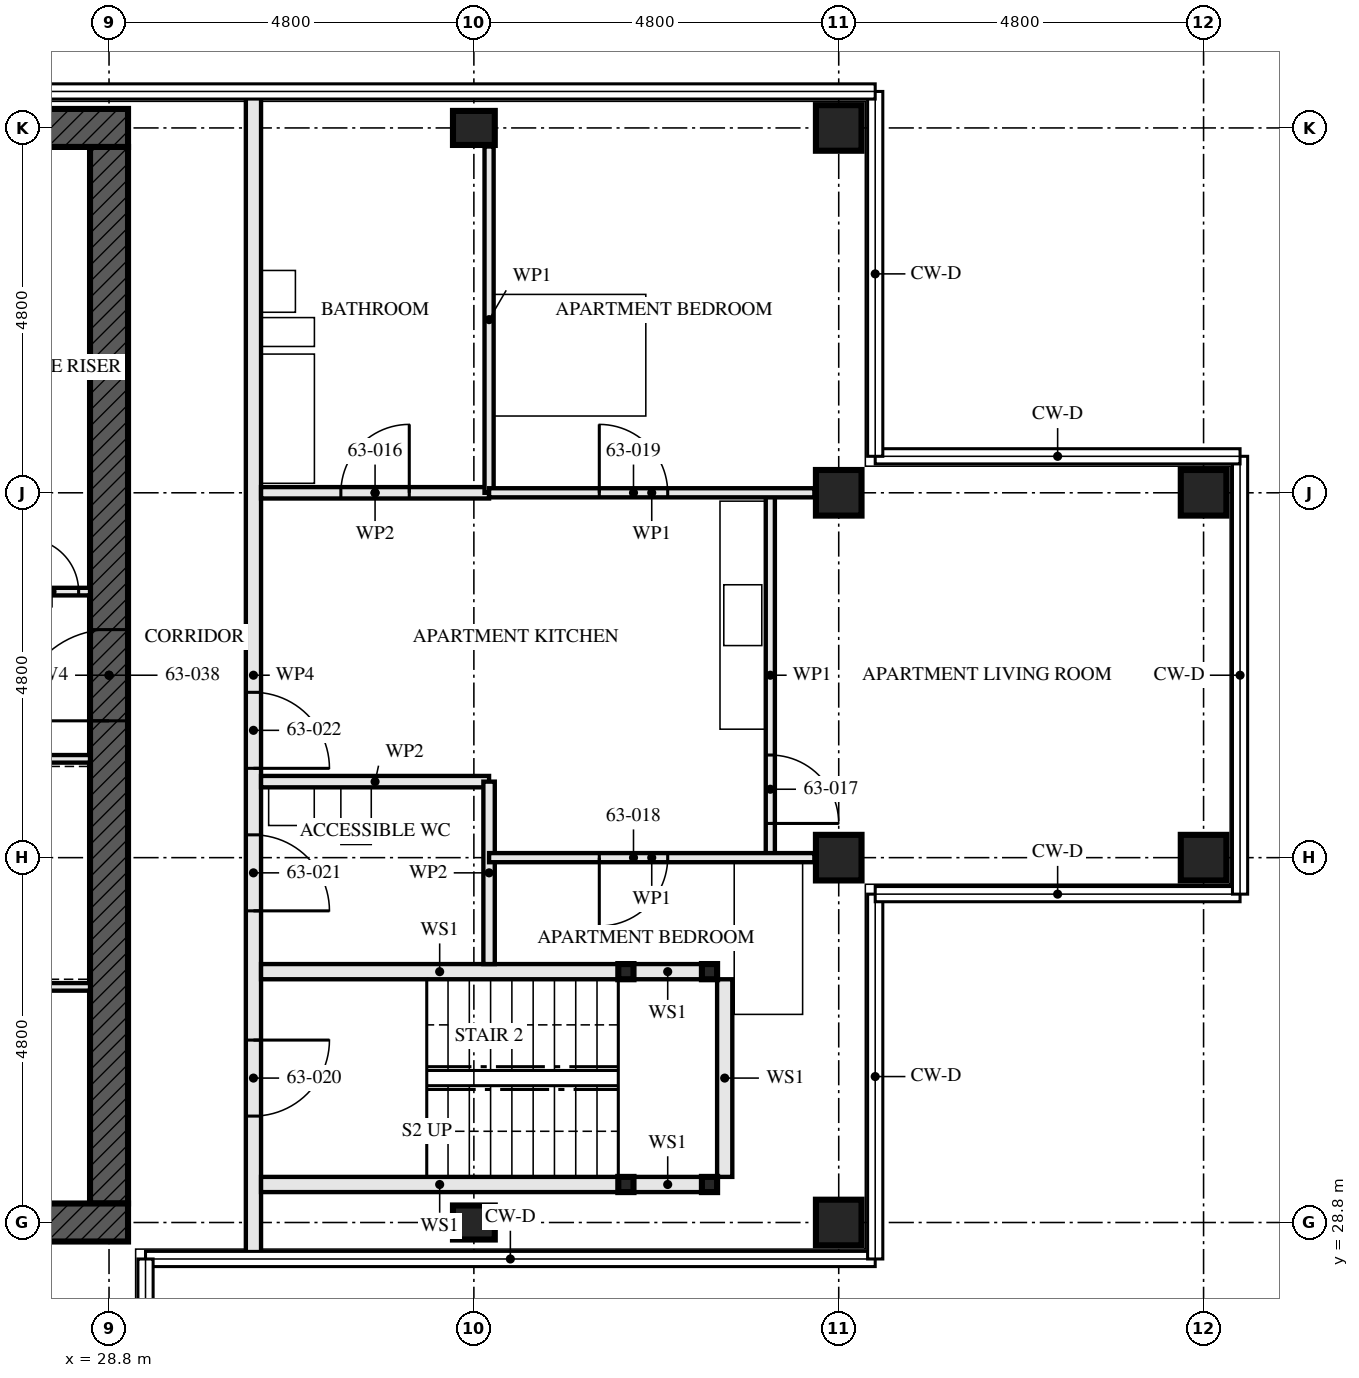
"""IFC4 building model, lengths in metres.
Left out: names, types, materials, properties, quantities, classifications, styles, units other than length and angle.
Written with IfcOpenShell. Run it as: python <this file> out.ifc"""

import sys

from ifc_helpers import new_model, si_unit, direction, frame, frame_2d, origin, origin_2d, place, context, subcontext, project, spatial, rectangle, hollow_rectangle, i_section, extrude, element, fill, save


model = new_model("IFC4")
c1 = context("Model", 3, precision=1e-05, world=origin(), true_north=direction((0.0, 1.0)))
c2 = subcontext(c1, "Body", "Model", "MODEL_VIEW")
j1 = project(units=[si_unit("LENGTHUNIT", "METRE"), si_unit("PLANEANGLEUNIT", "RADIAN")], contexts=[c1])
p1 = place(None, origin())
s1 = spatial("IfcSite", under=j1, at=p1, CompositionType="ELEMENT")
p2 = place(p1, origin())
s2 = spatial("IfcBuilding", under=s1, at=p2, CompositionType="ELEMENT")
p3 = place(p2, frame((0.0, 0.0, 229.5)))
s3 = spatial("IfcBuildingStorey", under=s2, at=p3, CompositionType="ELEMENT", Elevation=229.5)
for number, where, z_axis, x_axis in (
    (1, (33.6, 28.8, 0.0), (0.0, 0.0, 1.0), (0.0, 1.0, 0.0)),
    (2, (33.6, 43.2, 0.0), (0.0, 0.0, 1.0), (0.0, 1.0, 0.0)),
):
    element("IfcColumn", number, at=place(p3, frame(where, z_axis=z_axis, x_axis=x_axis)), inside=s3, PredefinedType="COLUMN", context=c2, shape_type="SweptSolid", body=[
        extrude(i_section(OverallWidth=0.448, OverallDepth=0.55, WebThickness=0.072, FlangeThickness=0.115, FilletRadius=0.015, at=origin_2d()), origin(), (0.0, 0.0, 1.0), 3.5),
    ])
for number, where, z_axis, x_axis in (
    (3, (38.4, 28.8, 0.0), (0.0, 0.0, 1.0), (0.0, 1.0, 0.0)),
    (4, (38.4, 33.6, 0.0), (0.0, 0.0, 1.0), (0.0, 1.0, 0.0)),
    (5, (38.4, 38.4, 0.0), (0.0, 0.0, 1.0), (0.0, 1.0, 0.0)),
    (6, (38.4, 43.2, 0.0), (0.0, 0.0, 1.0), (0.0, 1.0, 0.0)),
    (7, (43.2, 33.6, 0.0), (0.0, 0.0, 1.0), (0.0, 1.0, 0.0)),
    (8, (43.2, 38.4, 0.0), (0.0, 0.0, 1.0), (0.0, 1.0, 0.0)),
):
    element("IfcColumn", number, at=place(p3, frame(where, z_axis=z_axis, x_axis=x_axis)), inside=s3, PredefinedType="COLUMN", context=c2, shape_type="SweptSolid", body=[
        extrude(hollow_rectangle(XDim=0.6, YDim=0.6, WallThickness=0.05, at=origin_2d()), origin(), (0.0, 0.0, 1.0), 3.5),
    ])
p4 = place(p3, frame((14.15, 28.8, -0.17), z_axis=(0.0, 0.0, 1.0), x_axis=(1.0, 0.0, 0.0)))
e9 = element("IfcWall", 9, at=p4, inside=s3, PredefinedType="SHEAR", context=c2, shape_type="SweptSolid", body=[
    extrude(rectangle(XDim=14.9, YDim=0.5, at=frame_2d((7.45, 0.0))), origin(), (0.0, 0.0, 1.0), 3.5),
])
p5 = place(p4, frame((6.85, 0.0, 0.17)))
e10 = element("IfcOpeningElement", 10, at=p5, cuts=e9, PredefinedType="OPENING", context=c2, shape_type="SweptSolid", body=[
    extrude(rectangle(XDim=1.2, YDim=2.1, at=frame_2d((0.6, 1.05))), frame((0.0, 0.26, 0.0), z_axis=(0.0, -1.0, 0.0), x_axis=(1.0, 0.0, 0.0)), (0.0, 0.0, 1.0), 0.521),
])
p6 = place(p3, frame((29.05, 43.2, -0.17), z_axis=(0.0, 0.0, 1.0), x_axis=(-1.0, 0.0, 0.0)))
e11 = element("IfcWall", 11, at=p6, inside=s3, PredefinedType="SHEAR", context=c2, shape_type="SweptSolid", body=[
    extrude(rectangle(XDim=14.9, YDim=0.5, at=frame_2d((7.45, 0.0))), origin(), (0.0, 0.0, 1.0), 3.5),
])
p7 = place(p3, frame((28.8, 29.05, -0.17), z_axis=(0.0, 0.0, 1.0), x_axis=(0.0, 1.0, 0.0)))
e12 = element("IfcWall", 12, at=p7, inside=s3, PredefinedType="SHEAR", context=c2, shape_type="SweptSolid", body=[
    extrude(rectangle(XDim=13.9, YDim=0.5, at=frame_2d((6.95, 0.0))), origin(), (0.0, 0.0, 1.0), 3.5),
])
p8 = place(p7, frame((6.35, 0.0, 0.17)))
e13 = element("IfcOpeningElement", 13, at=p8, cuts=e12, PredefinedType="OPENING", context=c2, shape_type="SweptSolid", body=[
    extrude(rectangle(XDim=1.2, YDim=2.1, at=frame_2d((0.6, 1.05))), frame((0.0, 0.26, 0.0), z_axis=(0.0, -1.0, 0.0), x_axis=(1.0, 0.0, 0.0)), (0.0, 0.0, 1.0), 0.521),
])
for number, where, z_axis, x_axis in (
    (14, (36.7, 29.3, 0.0), (0.0, 0.0, 1.0), (1.0, 0.0, 0.0)),
    (15, (36.7, 32.1, 0.0), (0.0, 0.0, 1.0), (1.0, 0.0, 0.0)),
    (16, (35.6, 29.3, 0.0), (0.0, 0.0, 1.0), (1.0, 0.0, 0.0)),
    (17, (35.6, 32.1, 0.0), (0.0, 0.0, 1.0), (1.0, 0.0, 0.0)),
):
    element("IfcColumn", number, at=place(p3, frame(where, z_axis=z_axis, x_axis=x_axis)), inside=s3, PredefinedType="COLUMN", context=c2, shape_type="SweptSolid", body=[
        extrude(hollow_rectangle(XDim=0.2, YDim=0.2, WallThickness=0.008, at=origin_2d()), origin(), (0.0, 0.0, 1.0), 3.33),
    ])
p9 = place(p3, frame((36.6, 29.3, 0.0), z_axis=(0.0, 0.0, 1.0), x_axis=(-1.0, 0.0, 0.0)))
e18 = element("IfcWall", 18, at=p9, inside=s3, PredefinedType="SOLIDWALL", context=c2, shape_type="SweptSolid", body=[
    extrude(rectangle(XDim=0.9, YDim=0.2, at=frame_2d((0.45, 0.0))), origin(), (0.0, 0.0, 1.0), 2.99),
])
p10 = place(p3, frame((35.5, 29.3, 0.0), z_axis=(0.0, 0.0, 1.0), x_axis=(-1.0, 0.0, 0.0)))
e19 = element("IfcWall", 19, at=p10, inside=s3, PredefinedType="SOLIDWALL", context=c2, shape_type="SweptSolid", body=[
    extrude(rectangle(XDim=4.7, YDim=0.2, at=frame_2d((2.35, 0.0))), origin(), (0.0, 0.0, 1.0), 2.99),
])
p11 = place(p3, frame((36.6, 32.1, 0.0), z_axis=(0.0, 0.0, 1.0), x_axis=(-1.0, 0.0, 0.0)))
e20 = element("IfcWall", 20, at=p11, inside=s3, PredefinedType="SOLIDWALL", context=c2, shape_type="SweptSolid", body=[
    extrude(rectangle(XDim=0.9, YDim=0.2, at=frame_2d((0.45, 0.0))), origin(), (0.0, 0.0, 1.0), 2.99),
])
p12 = place(p3, frame((35.5, 32.1, 0.0), z_axis=(0.0, 0.0, 1.0), x_axis=(-1.0, 0.0, 0.0)))
e21 = element("IfcWall", 21, at=p12, inside=s3, PredefinedType="SOLIDWALL", context=c2, shape_type="SweptSolid", body=[
    extrude(rectangle(XDim=4.7, YDim=0.2, at=frame_2d((2.35, 0.0))), origin(), (0.0, 0.0, 1.0), 2.99),
])
p13 = place(p3, frame((36.9, 29.4, 0.0), z_axis=(0.0, 0.0, 1.0), x_axis=(0.0, 1.0, 0.0)))
e22 = element("IfcWall", 22, at=p13, inside=s3, PredefinedType="SOLIDWALL", context=c2, shape_type="SweptSolid", body=[
    extrude(rectangle(XDim=2.6, YDim=0.2, at=frame_2d((1.3, 0.0))), origin(), (0.0, 0.0, 1.0), 3.33),
])
p14 = place(p3, frame((33.8, 32.2, 0.0), z_axis=(0.0, 0.0, 1.0), x_axis=(0.0, 1.0, 0.0)))
e23 = element("IfcWall", 23, at=p14, inside=s3, PredefinedType="PARTITIONING", context=c2, shape_type="SweptSolid", body=[
    extrude(rectangle(XDim=2.4, YDim=0.15, at=frame_2d((1.2, 0.0))), origin(), (0.0, 0.0, 1.0), 2.55),
])
p15 = place(p3, frame((33.8, 34.6, 0.0), z_axis=(0.0, 0.0, 1.0), x_axis=(-1.0, 0.0, 0.0)))
e24 = element("IfcWall", 24, at=p15, inside=s3, PredefinedType="PARTITIONING", context=c2, shape_type="SweptSolid", body=[
    extrude(rectangle(XDim=3.0, YDim=0.15, at=frame_2d((1.5, 0.0))), origin(), (0.0, 0.0, 1.0), 3.33),
])
p16 = place(p3, frame((33.8, 38.4, 0.0), z_axis=(0.0, 0.0, 1.0), x_axis=(-1.0, 0.0, 0.0)))
e25 = element("IfcWall", 25, at=p16, inside=s3, PredefinedType="PARTITIONING", context=c2, shape_type="SweptSolid", body=[
    extrude(rectangle(XDim=3.0, YDim=0.15, at=frame_2d((1.5, 0.0))), origin(), (0.0, 0.0, 1.0), 2.55),
])
p17 = place(p16, frame((1.05, 0.0, 0.0)))
e26 = element("IfcOpeningElement", 26, at=p17, cuts=e25, PredefinedType="OPENING", context=c2, shape_type="SweptSolid", body=[
    extrude(rectangle(XDim=0.9, YDim=2.1, at=frame_2d((0.45, 1.05))), frame((0.0, 0.085, 0.0), z_axis=(0.0, -1.0, 0.0), x_axis=(1.0, 0.0, 0.0)), (0.0, 0.0, 1.0), 0.171),
])
p18 = place(p3, frame((37.5, 33.6, 0.0), z_axis=(0.0, 0.0, 1.0), x_axis=(0.0, 1.0, 0.0)))
e27 = element("IfcWall", 27, at=p18, inside=s3, PredefinedType="PARTITIONING", context=c2, shape_type="SweptSolid", body=[
    extrude(rectangle(XDim=4.8, YDim=0.12, at=frame_2d((2.4, 0.0))), origin(), (0.0, 0.0, 1.0), 3.33),
])
p19 = place(p18, frame((0.45, 0.0, 0.0)))
e28 = element("IfcOpeningElement", 28, at=p19, cuts=e27, PredefinedType="OPENING", context=c2, shape_type="SweptSolid", body=[
    extrude(rectangle(XDim=0.9, YDim=2.1, at=frame_2d((0.45, 1.05))), frame((0.0, 0.071, 0.0), z_axis=(0.0, -1.0, 0.0), x_axis=(1.0, 0.0, 0.0)), (0.0, 0.0, 1.0), 0.141),
])
p20 = place(p3, frame((33.8, 38.4, 0.0), z_axis=(0.0, 0.0, 1.0), x_axis=(0.0, 1.0, 0.0)))
e29 = element("IfcWall", 29, at=p20, inside=s3, PredefinedType="PARTITIONING", context=c2, shape_type="SweptSolid", body=[
    extrude(rectangle(XDim=4.556, YDim=0.12, at=frame_2d((2.278, 0.0))), origin(), (0.0, 0.0, 1.0), 3.33),
])
p21 = place(p3, frame((38.08, 33.6, 0.0), z_axis=(0.0, 0.0, 1.0), x_axis=(-1.0, 0.0, 0.0)))
e30 = element("IfcWall", 30, at=p21, inside=s3, PredefinedType="PARTITIONING", context=c2, shape_type="SweptSolid", body=[
    extrude(rectangle(XDim=4.28, YDim=0.12, at=frame_2d((2.14, 0.0))), origin(), (0.0, 0.0, 1.0), 2.55),
])
p22 = place(p21, frame((1.93, 0.0, 0.0)))
e31 = element("IfcOpeningElement", 31, at=p22, cuts=e30, PredefinedType="OPENING", context=c2, shape_type="SweptSolid", body=[
    extrude(rectangle(XDim=0.9, YDim=2.1, at=frame_2d((0.45, 1.05))), frame((0.0, 0.071, 0.0), z_axis=(0.0, -1.0, 0.0), x_axis=(1.0, 0.0, 0.0)), (0.0, 0.0, 1.0), 0.141),
])
p23 = place(p3, frame((38.08, 38.4, 0.0), z_axis=(0.0, 0.0, 1.0), x_axis=(-1.0, 0.0, 0.0)))
e32 = element("IfcWall", 32, at=p23, inside=s3, PredefinedType="PARTITIONING", context=c2, shape_type="SweptSolid", body=[
    extrude(rectangle(XDim=4.28, YDim=0.12, at=frame_2d((2.14, 0.0))), origin(), (0.0, 0.0, 1.0), 2.55),
])
p24 = place(p23, frame((1.93, 0.0, 0.0)))
e33 = element("IfcOpeningElement", 33, at=p24, cuts=e32, PredefinedType="OPENING", context=c2, shape_type="SweptSolid", body=[
    extrude(rectangle(XDim=0.9, YDim=2.1, at=frame_2d((0.45, 1.05))), frame((0.0, 0.071, 0.0), z_axis=(0.0, -1.0, 0.0), x_axis=(1.0, 0.0, 0.0)), (0.0, 0.0, 1.0), 0.141),
])
p25 = place(p3, frame((30.7, 28.345, 0.0), z_axis=(0.0, 0.0, 1.0), x_axis=(0.0, 1.0, 0.0)))
e34 = element("IfcWall", 34, at=p25, inside=s3, PredefinedType="PARTITIONING", context=c2, shape_type="SweptSolid", body=[
    extrude(rectangle(XDim=15.31, YDim=0.2, at=frame_2d((7.655, 0.0))), origin(), (0.0, 0.0, 1.0), 2.32),
])
p26 = place(p25, frame((1.855, 0.0, 0.0)))
e35 = element("IfcOpeningElement", 35, at=p26, cuts=e34, PredefinedType="OPENING", context=c2, shape_type="SweptSolid", body=[
    extrude(rectangle(XDim=1.0, YDim=2.1, at=frame_2d((0.5, 1.05))), frame((0.0, 0.111, 0.0), z_axis=(0.0, -1.0, 0.0), x_axis=(1.0, 0.0, 0.0)), (0.0, 0.0, 1.0), 0.221),
])
p27 = place(p25, frame((4.555, 0.0, 0.0)))
e36 = element("IfcOpeningElement", 36, at=p27, cuts=e34, PredefinedType="OPENING", context=c2, shape_type="SweptSolid", body=[
    extrude(rectangle(XDim=1.0, YDim=2.1, at=frame_2d((0.5, 1.05))), frame((0.0, 0.111, 0.0), z_axis=(0.0, -1.0, 0.0), x_axis=(1.0, 0.0, 0.0)), (0.0, 0.0, 1.0), 0.221),
])
p28 = place(p25, frame((6.43, 0.0, 0.0)))
e37 = element("IfcOpeningElement", 37, at=p28, cuts=e34, PredefinedType="OPENING", context=c2, shape_type="SweptSolid", body=[
    extrude(rectangle(XDim=1.0, YDim=2.1, at=frame_2d((0.5, 1.05))), frame((0.0, 0.111, 0.0), z_axis=(0.0, -1.0, 0.0), x_axis=(1.0, 0.0, 0.0)), (0.0, 0.0, 1.0), 0.221),
])
p29 = place(p3, frame((23.05, 34.9, 0.0), z_axis=(0.0, 0.0, 1.0), x_axis=(1.0, 0.0, 0.0)))
e38 = element("IfcWall", 38, at=p29, inside=s3, PredefinedType="SOLIDWALL", context=c2, shape_type="SweptSolid", body=[
    extrude(rectangle(XDim=5.5, YDim=0.1, at=frame_2d((2.75, 0.0))), origin(), (0.0, 0.0, 1.0), 3.33),
])
p30 = place(p29, frame((0.85, 0.0, 0.0)))
e39 = element("IfcOpeningElement", 39, at=p30, cuts=e38, PredefinedType="OPENING", context=c2, shape_type="SweptSolid", body=[
    extrude(rectangle(XDim=1.0, YDim=2.1, at=frame_2d((0.5, 1.05))), frame((0.0, 0.061, 0.0), z_axis=(0.0, -1.0, 0.0), x_axis=(1.0, 0.0, 0.0)), (0.0, 0.0, 1.0), 0.121),
])
p31 = place(p29, frame((3.625, 0.0, 0.0)))
e40 = element("IfcOpeningElement", 40, at=p31, cuts=e38, PredefinedType="OPENING", context=c2, shape_type="SweptSolid", body=[
    extrude(rectangle(XDim=1.0, YDim=2.1, at=frame_2d((0.5, 1.05))), frame((0.0, 0.061, 0.0), z_axis=(0.0, -1.0, 0.0), x_axis=(1.0, 0.0, 0.0)), (0.0, 0.0, 1.0), 0.121),
])
p32 = place(p3, frame((22.65, 37.1, 0.0), z_axis=(0.0, 0.0, 1.0), x_axis=(1.0, 0.0, 0.0)))
e41 = element("IfcWall", 41, at=p32, inside=s3, PredefinedType="SOLIDWALL", context=c2, shape_type="SweptSolid", body=[
    extrude(rectangle(XDim=5.9, YDim=0.1, at=frame_2d((2.95, 0.0))), origin(), (0.0, 0.0, 1.0), 3.33),
])
p33 = place(p32, frame((3.5, 0.0, 0.0)))
e42 = element("IfcOpeningElement", 42, at=p33, cuts=e41, PredefinedType="OPENING", context=c2, shape_type="SweptSolid", body=[
    extrude(rectangle(XDim=0.9, YDim=2.1, at=frame_2d((0.45, 1.05))), frame((0.0, 0.061, 0.0), z_axis=(0.0, -1.0, 0.0), x_axis=(1.0, 0.0, 0.0)), (0.0, 0.0, 1.0), 0.121),
])
p34 = place(p32, frame((5.05, 0.0, 0.0)))
e43 = element("IfcOpeningElement", 43, at=p34, cuts=e41, PredefinedType="OPENING", context=c2, shape_type="SweptSolid", body=[
    extrude(rectangle(XDim=0.7, YDim=2.1, at=frame_2d((0.35, 1.05))), frame((0.0, 0.061, 0.0), z_axis=(0.0, -1.0, 0.0), x_axis=(1.0, 0.0, 0.0)), (0.0, 0.0, 1.0), 0.121),
])
p35 = place(p3, frame((23.15, 31.9, 0.0), z_axis=(0.0, 0.0, 1.0), x_axis=(1.0, 0.0, 0.0)))
e44 = element("IfcWall", 44, at=p35, inside=s3, PredefinedType="SOLIDWALL", context=c2, shape_type="SweptSolid", body=[
    extrude(rectangle(XDim=5.4, YDim=0.1, at=frame_2d((2.7, 0.0))), origin(), (0.0, 0.0, 1.0), 3.33),
])
p36 = place(p17, frame((0.9, 0.0, 0.0), z_axis=(0.0, 0.0, 1.0), x_axis=(-1.0, 0.0, 0.0)))
e45 = element("IfcDoor", 45, at=p36, inside=s3, OperationType="SINGLE_SWING_LEFT", PredefinedType="DOOR", context=c2, shape_type="SweptSolid", body=[
    extrude(rectangle(XDim=0.9, YDim=2.1, at=frame_2d((0.45, 1.05))), frame((0.0, 0.022, 0.0), z_axis=(0.0, -1.0, 0.0), x_axis=(1.0, 0.0, 0.0)), (0.0, 0.0, 1.0), 0.044),
])
fill(e26, e45)
p37 = place(p19, frame((0.9, 0.0, 0.0), z_axis=(0.0, 0.0, 1.0), x_axis=(-1.0, 0.0, 0.0)))
e46 = element("IfcDoor", 46, at=p37, inside=s3, OperationType="SINGLE_SWING_LEFT", PredefinedType="DOOR", context=c2, shape_type="SweptSolid", body=[
    extrude(rectangle(XDim=0.9, YDim=2.1, at=frame_2d((0.45, 1.05))), frame((0.0, 0.022, 0.0), z_axis=(0.0, -1.0, 0.0), x_axis=(1.0, 0.0, 0.0)), (0.0, 0.0, 1.0), 0.044),
])
fill(e28, e46)
p38 = place(p22, origin())
e47 = element("IfcDoor", 47, at=p38, inside=s3, OperationType="SINGLE_SWING_LEFT", PredefinedType="DOOR", context=c2, shape_type="SweptSolid", body=[
    extrude(rectangle(XDim=0.9, YDim=2.1, at=frame_2d((0.45, 1.05))), frame((0.0, 0.022, 0.0), z_axis=(0.0, -1.0, 0.0), x_axis=(1.0, 0.0, 0.0)), (0.0, 0.0, 1.0), 0.044),
])
fill(e31, e47)
p39 = place(p24, frame((0.9, 0.0, 0.0), z_axis=(0.0, 0.0, 1.0), x_axis=(-1.0, 0.0, 0.0)))
e48 = element("IfcDoor", 48, at=p39, inside=s3, OperationType="SINGLE_SWING_RIGHT", PredefinedType="DOOR", context=c2, shape_type="SweptSolid", body=[
    extrude(rectangle(XDim=0.9, YDim=2.1, at=frame_2d((0.45, 1.05))), frame((0.0, 0.022, 0.0), z_axis=(0.0, -1.0, 0.0), x_axis=(1.0, 0.0, 0.0)), (0.0, 0.0, 1.0), 0.044),
])
fill(e33, e48)
p40 = place(p26, frame((1.0, 0.0, 0.0), z_axis=(0.0, 0.0, 1.0), x_axis=(-1.0, 0.0, 0.0)))
e49 = element("IfcDoor", 49, at=p40, inside=s3, OperationType="SINGLE_SWING_RIGHT", PredefinedType="DOOR", context=c2, shape_type="SweptSolid", body=[
    extrude(rectangle(XDim=1.0, YDim=2.1, at=frame_2d((0.5, 1.05))), frame((0.0, 0.032, 0.0), z_axis=(0.0, -1.0, 0.0), x_axis=(1.0, 0.0, 0.0)), (0.0, 0.0, 1.0), 0.064),
])
fill(e35, e49)
p41 = place(p27, frame((1.0, 0.0, 0.0), z_axis=(0.0, 0.0, 1.0), x_axis=(-1.0, 0.0, 0.0)))
e50 = element("IfcDoor", 50, at=p41, inside=s3, OperationType="SINGLE_SWING_LEFT", PredefinedType="DOOR", context=c2, shape_type="SweptSolid", body=[
    extrude(rectangle(XDim=1.0, YDim=2.1, at=frame_2d((0.5, 1.05))), frame((0.0, 0.027, 0.0), z_axis=(0.0, -1.0, 0.0), x_axis=(1.0, 0.0, 0.0)), (0.0, 0.0, 1.0), 0.054),
])
fill(e36, e50)
p42 = place(p28, frame((1.0, 0.0, 0.0), z_axis=(0.0, 0.0, 1.0), x_axis=(-1.0, 0.0, 0.0)))
e51 = element("IfcDoor", 51, at=p42, inside=s3, OperationType="SINGLE_SWING_LEFT", PredefinedType="DOOR", context=c2, shape_type="SweptSolid", body=[
    extrude(rectangle(XDim=1.0, YDim=2.1, at=frame_2d((0.5, 1.05))), frame((0.0, 0.027, 0.0), z_axis=(0.0, -1.0, 0.0), x_axis=(1.0, 0.0, 0.0)), (0.0, 0.0, 1.0), 0.054),
])
fill(e37, e51)
p43 = place(p34, origin())
e52 = element("IfcDoor", 52, at=p43, inside=s3, OperationType="SINGLE_SWING_RIGHT", PredefinedType="DOOR", context=c2, shape_type="SweptSolid", body=[
    extrude(rectangle(XDim=0.7, YDim=2.1, at=frame_2d((0.35, 1.05))), frame((0.0, 0.027, 0.0), z_axis=(0.0, -1.0, 0.0), x_axis=(1.0, 0.0, 0.0)), (0.0, 0.0, 1.0), 0.054),
])
fill(e43, e52)
p44 = place(p8, origin())
e53 = element("IfcDoor", 53, at=p44, inside=s3, OperationType="SINGLE_SWING_LEFT", PredefinedType="DOOR", context=c2, shape_type="SweptSolid", body=[
    extrude(rectangle(XDim=1.2, YDim=2.1, at=frame_2d((0.6, 1.05))), frame((0.0, 0.027, 0.0), z_axis=(0.0, -1.0, 0.0), x_axis=(1.0, 0.0, 0.0)), (0.0, 0.0, 1.0), 0.054),
])
fill(e13, e53)
save(model, sys.argv[1])
